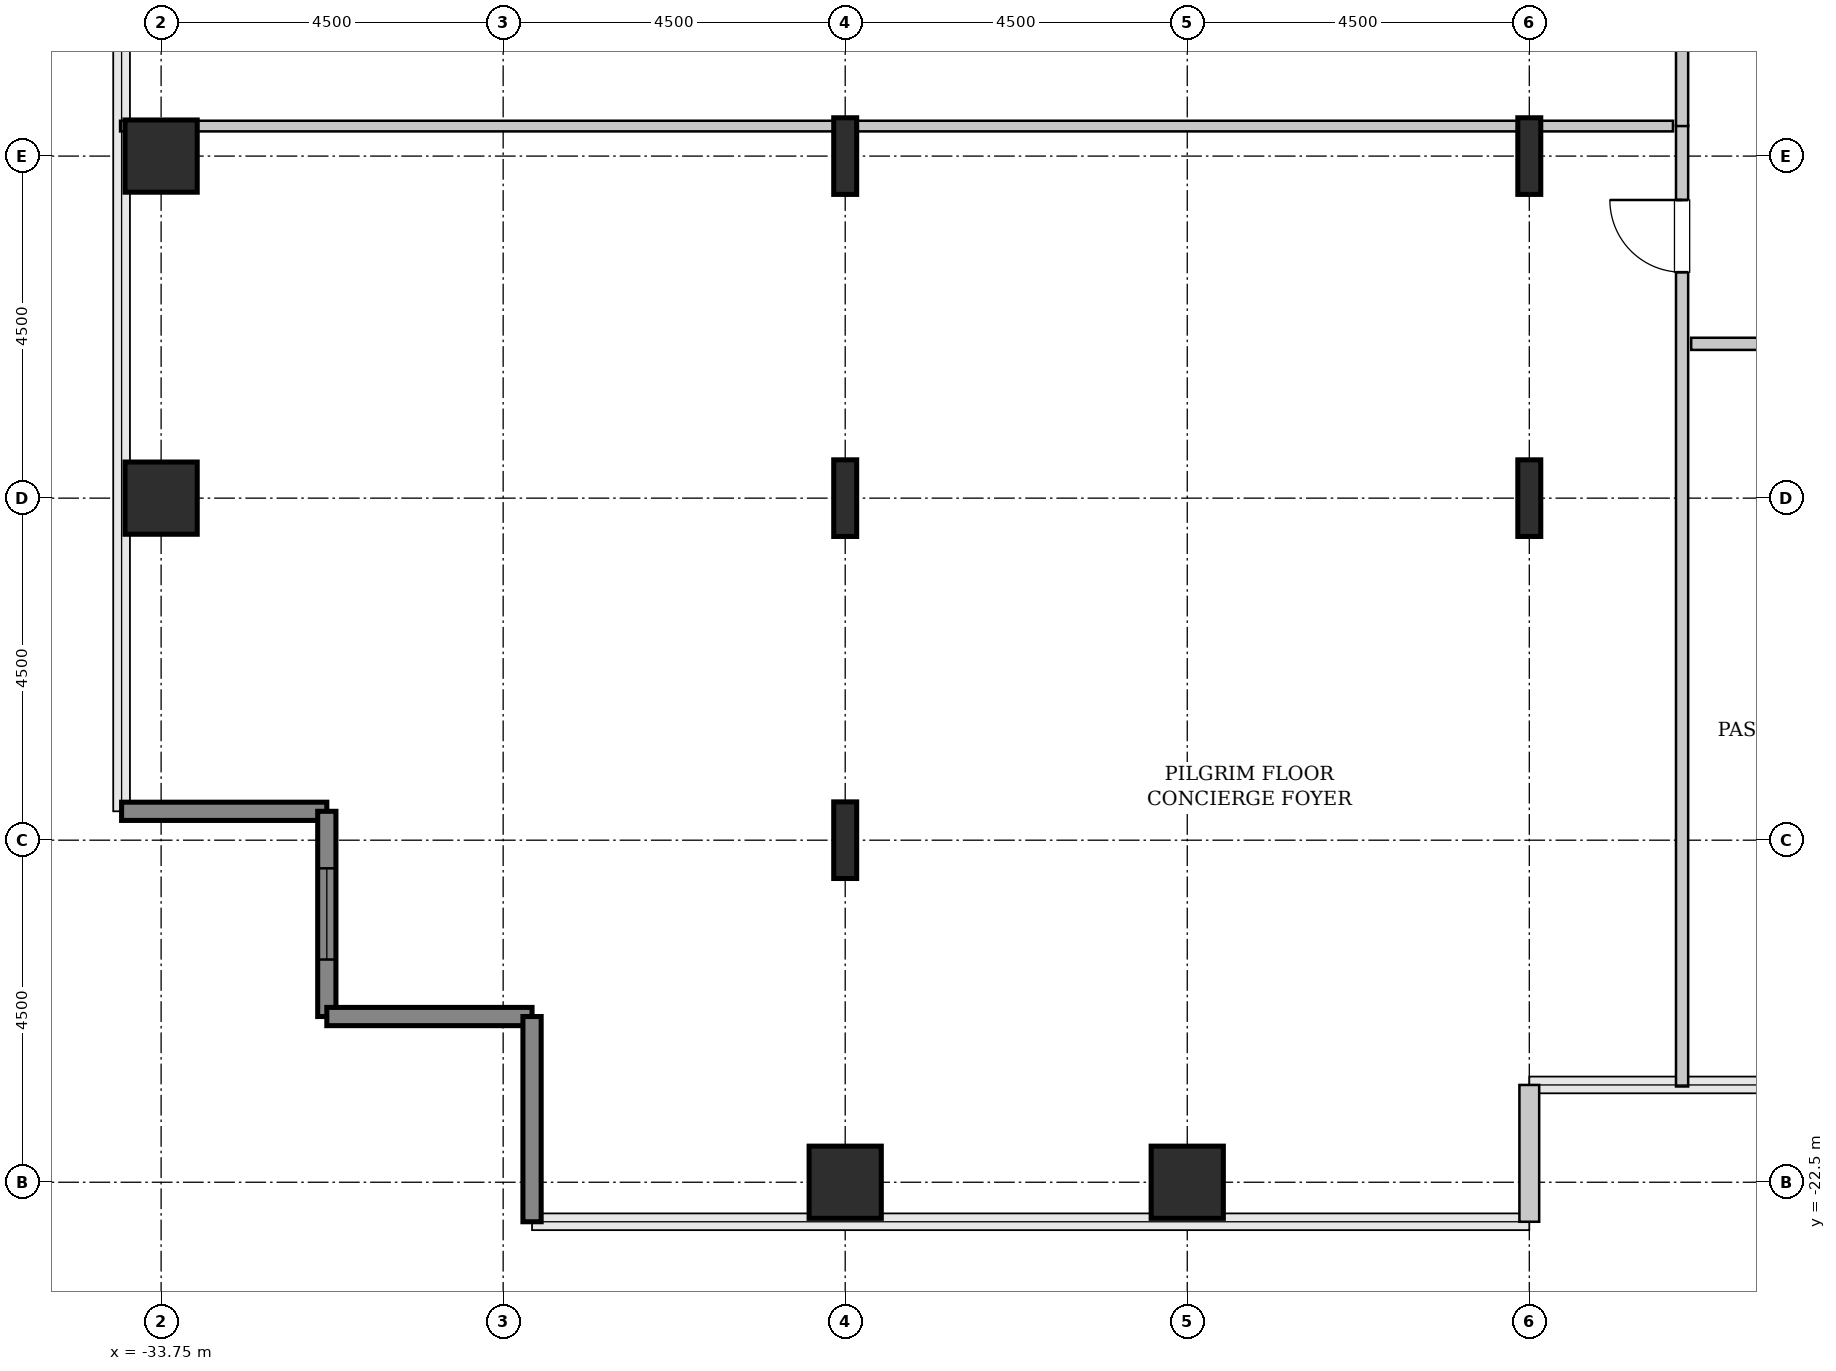
"""IFC4 building model, lengths in metres.
Left out: names, types, materials, properties, quantities, classifications, styles, units other than length and angle.
Written with IfcOpenShell. Run it as: python <this file> out.ifc"""

import sys

from ifc_helpers import new_model, si_unit, direction, frame, frame_2d, origin, origin_2d, place, context, subcontext, project, spatial, rectangle, hollow_rectangle, i_section, extrude, source, transform, mapped, element, fill, save


model = new_model("IFC4")
c1 = context("Model", 3, precision=1e-05, world=origin(), true_north=direction((0.0, 1.0)))
c2 = subcontext(c1, "Body", "Model", "MODEL_VIEW")
j1 = project(units=[si_unit("LENGTHUNIT", "METRE"), si_unit("PLANEANGLEUNIT", "RADIAN")], contexts=[c1])
p1 = place(None, origin())
s1 = spatial("IfcSite", under=j1, at=p1, CompositionType="ELEMENT")
p2 = place(p1, origin())
s2 = spatial("IfcBuilding", under=s1, at=p2, CompositionType="ELEMENT")
p3 = place(p2, frame((0.0, 0.0, 71.0)))
s3 = spatial("IfcBuildingStorey", under=s2, at=p3, CompositionType="ELEMENT", Elevation=71.0)
m1 = source(origin(), c2, "Body", "SweptSolid", [
    extrude(hollow_rectangle(XDim=0.95, YDim=0.95, WallThickness=0.045, InnerFilletRadius=0.045, OuterFilletRadius=0.09, at=origin_2d()), origin(), (0.0, 0.0, 1.0), 3.8),
])
for number, where, z_axis, x_axis in (
    (1, (-33.75, -13.5, 0.0), (0.0, 0.0, 1.0), (1.0, 0.0, 0.0)),
    (2, (-33.75, -9.0, 0.0), (0.0, 0.0, 1.0), (1.0, 0.0, 0.0)),
    (3, (-24.75, -22.5, 0.0), (0.0, 0.0, 1.0), (1.0, 0.0, 0.0)),
):
    element("IfcColumn", number, at=place(p3, frame(where, z_axis=z_axis, x_axis=x_axis)), inside=s3, PredefinedType="COLUMN", context=c2, shape_type="MappedRepresentation", body=[
        mapped(m1, transform((0.0, 0.0, 0.0), x_axis=(1.0, 0.0, 0.0), y_axis=(0.0, 1.0, 0.0), z_axis=(0.0, 0.0, 1.0), scale=1.0)),
    ])
m2 = source(origin(), c2, "Body", "SweptSolid", [
    extrude(i_section(OverallWidth=0.302, OverallDepth=1.008, WebThickness=0.021, FlangeThickness=0.04, FilletRadius=0.03, at=origin_2d()), origin(), (0.0, 0.0, 1.0), 3.8),
])
for number, where, z_axis, x_axis in (
    (4, (-24.75, -18.0, 0.0), (0.0, 0.0, 1.0), (1.0, 0.0, 0.0)),
    (5, (-24.75, -13.5, 0.0), (0.0, 0.0, 1.0), (1.0, 0.0, 0.0)),
    (6, (-24.75, -9.0, 0.0), (0.0, 0.0, 1.0), (1.0, 0.0, 0.0)),
):
    element("IfcColumn", number, at=place(p3, frame(where, z_axis=z_axis, x_axis=x_axis)), inside=s3, PredefinedType="COLUMN", context=c2, shape_type="MappedRepresentation", body=[
        mapped(m2, transform((0.0, 0.0, 0.0), x_axis=(1.0, 0.0, 0.0), y_axis=(0.0, 1.0, 0.0), z_axis=(0.0, 0.0, 1.0), scale=1.0)),
    ])
p4 = place(p3, frame((-20.25, -22.5, 0.0), z_axis=(0.0, 0.0, 1.0), x_axis=(1.0, 0.0, 0.0)))
e7 = element("IfcColumn", 7, at=p4, inside=s3, PredefinedType="COLUMN", context=c2, shape_type="MappedRepresentation", body=[
    mapped(m1, transform((0.0, 0.0, 0.0), x_axis=(1.0, 0.0, 0.0), y_axis=(0.0, 1.0, 0.0), z_axis=(0.0, 0.0, 1.0), scale=1.0)),
])
for number, where, z_axis, x_axis in (
    (8, (-15.75, -13.5, 0.0), (0.0, 0.0, 1.0), (1.0, 0.0, 0.0)),
    (9, (-15.75, -9.0, 0.0), (0.0, 0.0, 1.0), (1.0, 0.0, 0.0)),
):
    element("IfcColumn", number, at=place(p3, frame(where, z_axis=z_axis, x_axis=x_axis)), inside=s3, PredefinedType="COLUMN", context=c2, shape_type="MappedRepresentation", body=[
        mapped(m2, transform((0.0, 0.0, 0.0), x_axis=(1.0, 0.0, 0.0), y_axis=(0.0, 1.0, 0.0), z_axis=(0.0, 0.0, 1.0), scale=1.0)),
    ])
m3 = source(origin(), c2, "Body", "SweptSolid", [
    extrude(rectangle(XDim=2.7, YDim=0.24, at=frame_2d((1.35, 0.0))), origin(), (0.0, 0.0, 1.0), 3.55),
])
p5 = place(p3, frame((-34.27, -17.62, 0.0), z_axis=(0.0, 0.0, 1.0), x_axis=(1.0, 0.0, 0.0)))
e10 = element("IfcWall", 10, at=p5, inside=s3, PredefinedType="SHEAR", context=c2, shape_type="MappedRepresentation", body=[
    mapped(m3, transform((0.0, 0.0, 0.0), x_axis=(1.0, 0.0, 0.0), y_axis=(0.0, 1.0, 0.0), z_axis=(0.0, 0.0, 1.0), scale=1.0)),
])
p6 = place(p3, frame((-31.57, -17.62, 0.0), z_axis=(0.0, 0.0, 1.0), x_axis=(0.0, -1.0, 0.0)))
e11 = element("IfcWall", 11, at=p6, inside=s3, PredefinedType="SHEAR", context=c2, shape_type="MappedRepresentation", body=[
    mapped(m3, transform((0.0, 0.0, 0.0), x_axis=(1.0, 0.0, 0.0), y_axis=(0.0, 1.0, 0.0), z_axis=(0.0, 0.0, 1.0), scale=1.0)),
])
p7 = place(p6, frame((0.75, 0.0, 0.85)))
e12 = element("IfcOpeningElement", 12, at=p7, cuts=e11, PredefinedType="OPENING", context=c2, shape_type="SweptSolid", body=[
    extrude(rectangle(XDim=1.2, YDim=1.8, at=frame_2d((0.6, 0.9))), frame((0.0, 0.13, 0.0), z_axis=(0.0, -1.0, 0.0), x_axis=(1.0, 0.0, 0.0)), (0.0, 0.0, 1.0), 0.26),
])
for number, where, z_axis, x_axis in (
    (13, (-31.57, -20.32, 0.0), (0.0, 0.0, 1.0), (1.0, 0.0, 0.0)),
    (14, (-28.87, -20.32, 0.0), (0.0, 0.0, 1.0), (0.0, -1.0, 0.0)),
):
    element("IfcWall", number, at=place(p3, frame(where, z_axis=z_axis, x_axis=x_axis)), inside=s3, PredefinedType="SHEAR", context=c2, shape_type="MappedRepresentation", body=[
        mapped(m3, transform((0.0, 0.0, 0.0), x_axis=(1.0, 0.0, 0.0), y_axis=(0.0, 1.0, 0.0), z_axis=(0.0, 0.0, 1.0), scale=1.0)),
    ])
m4 = source(origin(), c2, "Body", "SweptSolid", [
    extrude(rectangle(XDim=1.8, YDim=0.26, at=frame_2d((0.9, 0.0))), origin(), (0.0, 0.0, 1.0), 3.55),
])
p8 = place(p3, frame((-15.75, -23.02, 0.0), z_axis=(0.0, 0.0, 1.0), x_axis=(0.0, 1.0, 0.0)))
e15 = element("IfcWall", 15, at=p8, inside=s3, PredefinedType="SOLIDWALL", context=c2, shape_type="MappedRepresentation", body=[
    mapped(m4, transform((0.0, 0.0, 0.0), x_axis=(1.0, 0.0, 0.0), y_axis=(0.0, 1.0, 0.0), z_axis=(0.0, 0.0, 1.0), scale=1.0)),
])
m5 = source(origin(), c2, "Body", "SweptSolid", [
    extrude(rectangle(XDim=12.645, YDim=0.16, at=frame_2d((6.323, 0.0))), origin(), (0.0, 0.0, 1.0), 3.535),
])
p9 = place(p3, frame((-13.74, -21.24, 0.0), z_axis=(0.0, 0.0, 1.0), x_axis=(0.0, 1.0, 0.0)))
e16 = element("IfcWall", 16, at=p9, inside=s3, PredefinedType="PARTITIONING", context=c2, shape_type="MappedRepresentation", body=[
    mapped(m5, transform((0.0, 0.0, 0.0), x_axis=(1.0, 0.0, 0.0), y_axis=(0.0, 1.0, 0.0), z_axis=(0.0, 0.0, 1.0), scale=1.0)),
])
p10 = place(p9, frame((10.712, 0.0, 0.0)))
e17 = element("IfcOpeningElement", 17, at=p10, cuts=e16, PredefinedType="OPENING", context=c2, shape_type="SweptSolid", body=[
    extrude(rectangle(XDim=0.95, YDim=2.1, at=frame_2d((0.475, 1.05))), frame((0.0, 0.09, 0.0), z_axis=(0.0, -1.0, 0.0), x_axis=(1.0, 0.0, 0.0)), (0.0, 0.0, 1.0), 0.18),
])
m6 = source(origin(), c2, "Body", "SweptSolid", [
    extrude(rectangle(XDim=20.43, YDim=0.14, at=frame_2d((10.215, 0.0))), origin(), (0.0, 0.0, 1.0), 2.825),
])
p11 = place(p3, frame((-34.29, -8.605, 0.0), z_axis=(0.0, 0.0, 1.0), x_axis=(1.0, 0.0, 0.0)))
e18 = element("IfcWall", 18, at=p11, inside=s3, PredefinedType="PARTITIONING", context=c2, shape_type="MappedRepresentation", body=[
    mapped(m6, transform((0.0, 0.0, 0.0), x_axis=(1.0, 0.0, 0.0), y_axis=(0.0, 1.0, 0.0), z_axis=(0.0, 0.0, 1.0), scale=1.0)),
])
m7 = source(origin(), c2, "Body", "SweptSolid", [
    extrude(rectangle(XDim=3.21, YDim=0.16, at=frame_2d((1.605, 0.0))), origin(), (0.0, 0.0, 1.0), 3.535),
])
p12 = place(p3, frame((-13.74, -8.605, 0.0), z_axis=(0.0, 0.0, 1.0), x_axis=(0.0, 1.0, 0.0)))
e19 = element("IfcWall", 19, at=p12, inside=s3, PredefinedType="PARTITIONING", context=c2, shape_type="MappedRepresentation", body=[
    mapped(m7, transform((0.0, 0.0, 0.0), x_axis=(1.0, 0.0, 0.0), y_axis=(0.0, 1.0, 0.0), z_axis=(0.0, 0.0, 1.0), scale=1.0)),
])
p13 = place(p12, frame((1.13, 0.0, 0.0)))
e20 = element("IfcOpeningElement", 20, at=p13, cuts=e19, PredefinedType="OPENING", context=c2, shape_type="SweptSolid", body=[
    extrude(rectangle(XDim=0.95, YDim=2.1, at=frame_2d((0.475, 1.05))), frame((0.0, 0.09, 0.0), z_axis=(0.0, -1.0, 0.0), x_axis=(1.0, 0.0, 0.0)), (0.0, 0.0, 1.0), 0.18),
])
m8 = source(origin(), c2, "Body", "SweptSolid", [
    extrude(rectangle(XDim=7.225, YDim=0.16, at=frame_2d((3.613, 0.0))), origin(), (0.0, 0.0, 1.0), 3.535),
])
p14 = place(p3, frame((-13.62, -11.47, 0.0), z_axis=(0.0, 0.0, 1.0), x_axis=(1.0, 0.0, 0.0)))
e21 = element("IfcWall", 21, at=p14, inside=s3, PredefinedType="PARTITIONING", context=c2, shape_type="MappedRepresentation", body=[
    mapped(m8, transform((0.0, 0.0, 0.0), x_axis=(1.0, 0.0, 0.0), y_axis=(0.0, 1.0, 0.0), z_axis=(0.0, 0.0, 1.0), scale=1.0)),
])
p15 = place(p14, frame((3.137, 0.0, 0.0)))
e22 = element("IfcOpeningElement", 22, at=p15, cuts=e21, PredefinedType="OPENING", context=c2, shape_type="SweptSolid", body=[
    extrude(rectangle(XDim=0.95, YDim=2.1, at=frame_2d((0.475, 1.05))), frame((0.0, 0.09, 0.0), z_axis=(0.0, -1.0, 0.0), x_axis=(1.0, 0.0, 0.0)), (0.0, 0.0, 1.0), 0.18),
])
m9 = source(origin(), c2, "Body", "SweptSolid", [
    extrude(rectangle(XDim=1.2, YDim=1.8, at=frame_2d((0.6, 0.9))), frame((0.0, 0.03, 0.0), z_axis=(0.0, -1.0, 0.0), x_axis=(1.0, 0.0, 0.0)), (0.0, 0.0, 1.0), 0.06),
])
p16 = place(p7, origin())
e23 = element("IfcWindow", 23, at=p16, inside=s3, PartitioningType="SINGLE_PANEL", PredefinedType="WINDOW", context=c2, shape_type="MappedRepresentation", body=[
    mapped(m9, transform((0.0, 0.0, 0.0), x_axis=(1.0, 0.0, 0.0), y_axis=(0.0, 1.0, 0.0), z_axis=(0.0, 0.0, 1.0), scale=1.0)),
])
fill(e12, e23)
m10 = source(origin(), c2, "Body", "SweptSolid", [
    extrude(rectangle(XDim=0.95, YDim=2.1, at=frame_2d((0.475, 1.05))), frame((0.0, 0.025, 0.0), z_axis=(0.0, -1.0, 0.0), x_axis=(1.0, 0.0, 0.0)), (0.0, 0.0, 1.0), 0.05),
])
p17 = place(p10, origin())
e24 = element("IfcDoor", 24, at=p17, inside=s3, OperationType="SINGLE_SWING_RIGHT", PredefinedType="DOOR", context=c2, shape_type="MappedRepresentation", body=[
    mapped(m10, transform((0.0, 0.0, 0.0), x_axis=(1.0, 0.0, 0.0), y_axis=(0.0, 1.0, 0.0), z_axis=(0.0, 0.0, 1.0), scale=1.0)),
])
fill(e17, e24)
save(model, sys.argv[1])
